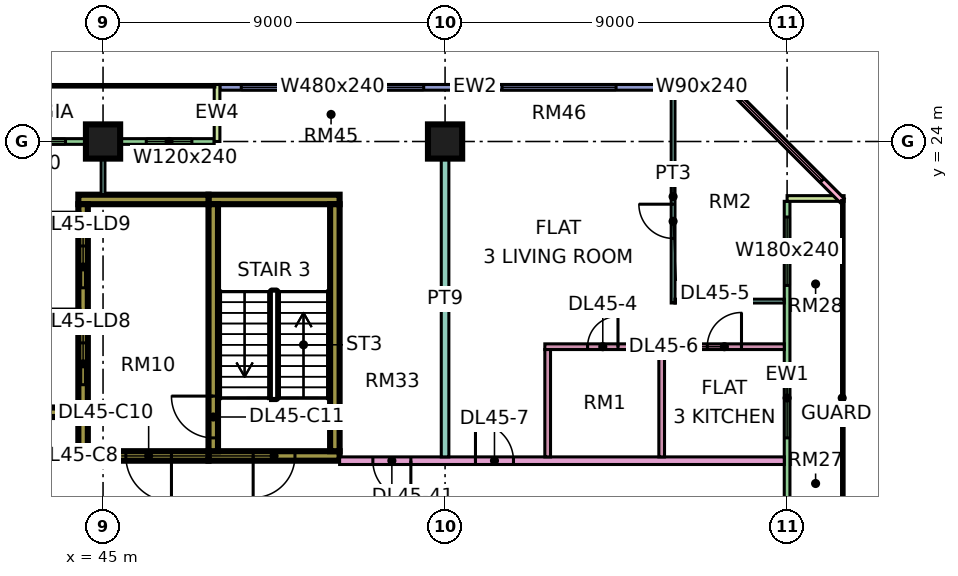
"""IFC4 building model, lengths in metres.
Left out: names, types, materials, properties, quantities, classifications, styles, units other than length and angle.
Written with IfcOpenShell. Run it as: python <this file> out.ifc"""

import sys

from ifc_helpers import new_model, si_unit, direction, frame, frame_2d, origin, origin_2d, place, context, subcontext, project, spatial, rectangle, extrude, element, fill, save


model = new_model("IFC4")
c1 = context("Model", 3, precision=1e-05, world=origin(), true_north=direction((0.0, 1.0)))
c2 = subcontext(c1, "Body", "Model", "MODEL_VIEW")
j1 = project(units=[si_unit("LENGTHUNIT", "METRE"), si_unit("PLANEANGLEUNIT", "RADIAN")], contexts=[c1])
p1 = place(None, origin())
s1 = spatial("IfcSite", under=j1, at=p1, CompositionType="ELEMENT")
p2 = place(p1, origin())
s2 = spatial("IfcBuilding", under=s1, at=p2, CompositionType="ELEMENT")
p3 = place(p2, frame((0.0, 0.0, 194.9)))
s3 = spatial("IfcBuildingStorey", under=s2, at=p3, CompositionType="ELEMENT", Elevation=194.9)
for number, where, z_axis, x_axis in (
    (1, (45.0, 24.0, 0.0), (0.0, 0.0, 1.0), (1.0, 0.0, 0.0)),
    (2, (54.0, 24.0, 0.0), (0.0, 0.0, 1.0), (1.0, 0.0, 0.0)),
):
    element("IfcColumn", number, at=place(p3, frame(where, z_axis=z_axis, x_axis=x_axis)), inside=s3, PredefinedType="COLUMN", context=c2, shape_type="SweptSolid", body=[
        extrude(rectangle(XDim=0.9, YDim=0.9, at=origin_2d()), origin(), (0.0, 0.0, 1.0), 3.75),
    ])
p4 = place(p3, frame((47.775, 15.725, 0.0), z_axis=(0.0, 0.0, 1.0), x_axis=(1.0, 0.0, 0.0)))
e3 = element("IfcWall", 3, at=p4, inside=s3, PredefinedType="SHEAR", context=c2, shape_type="SweptSolid", body=[
    extrude(rectangle(XDim=3.45, YDim=0.25, at=frame_2d((1.725, 0.0))), origin(), (0.0, 0.0, 1.0), 3.75),
])
p5 = place(p4, frame((1.175, 0.0, 0.0)))
e4 = element("IfcOpeningElement", 4, at=p5, cuts=e3, PredefinedType="OPENING", context=c2, shape_type="SweptSolid", body=[
    extrude(rectangle(XDim=1.1, YDim=2.2, at=frame_2d((0.55, 1.1))), frame((0.0, 0.135, 0.0), z_axis=(0.0, -1.0, 0.0), x_axis=(1.0, 0.0, 0.0)), (0.0, 0.0, 1.0), 0.27),
])
p6 = place(p3, frame((47.775, 22.475, 0.0), z_axis=(0.0, 0.0, 1.0), x_axis=(1.0, 0.0, 0.0)))
e5 = element("IfcWall", 5, at=p6, inside=s3, PredefinedType="SHEAR", context=c2, shape_type="SweptSolid", body=[
    extrude(rectangle(XDim=3.45, YDim=0.25, at=frame_2d((1.725, 0.0))), origin(), (0.0, 0.0, 1.0), 3.75),
])
p7 = place(p3, frame((47.9, 15.85, 0.0), z_axis=(0.0, 0.0, 1.0), x_axis=(0.0, 1.0, 0.0)))
e6 = element("IfcWall", 6, at=p7, inside=s3, PredefinedType="SHEAR", context=c2, shape_type="SweptSolid", body=[
    extrude(rectangle(XDim=6.5, YDim=0.25, at=frame_2d((3.25, 0.0))), origin(), (0.0, 0.0, 1.0), 3.75),
])
p8 = place(p7, frame((0.35, 0.0, 0.0)))
e7 = element("IfcOpeningElement", 7, at=p8, cuts=e6, PredefinedType="OPENING", context=c2, shape_type="SweptSolid", body=[
    extrude(rectangle(XDim=1.1, YDim=2.2, at=frame_2d((0.55, 1.1))), frame((0.0, 0.135, 0.0), z_axis=(0.0, -1.0, 0.0), x_axis=(1.0, 0.0, 0.0)), (0.0, 0.0, 1.0), 0.27),
])
p9 = place(p3, frame((51.1, 15.85, 0.0), z_axis=(0.0, 0.0, 1.0), x_axis=(0.0, 1.0, 0.0)))
e8 = element("IfcWall", 8, at=p9, inside=s3, PredefinedType="SHEAR", context=c2, shape_type="SweptSolid", body=[
    extrude(rectangle(XDim=6.5, YDim=0.25, at=frame_2d((3.25, 0.0))), origin(), (0.0, 0.0, 1.0), 3.75),
])
p10 = place(p3, frame((44.35, 15.725, 0.0), z_axis=(0.0, 0.0, 1.0), x_axis=(1.0, 0.0, 0.0)))
e9 = element("IfcWall", 9, at=p10, inside=s3, PredefinedType="SHEAR", context=c2, shape_type="SweptSolid", body=[
    extrude(rectangle(XDim=3.425, YDim=0.25, at=frame_2d((1.712, 0.0))), origin(), (0.0, 0.0, 1.0), 3.75),
])
p11 = place(p10, frame((1.25, 0.0, 0.0)))
e10 = element("IfcOpeningElement", 10, at=p11, cuts=e9, PredefinedType="OPENING", context=c2, shape_type="SweptSolid", body=[
    extrude(rectangle(XDim=1.2, YDim=2.2, at=frame_2d((0.6, 1.1))), frame((0.0, 0.135, 0.0), z_axis=(0.0, -1.0, 0.0), x_axis=(1.0, 0.0, 0.0)), (0.0, 0.0, 1.0), 0.27),
])
p12 = place(p3, frame((44.35, 22.475, 0.0), z_axis=(0.0, 0.0, 1.0), x_axis=(1.0, 0.0, 0.0)))
e11 = element("IfcWall", 11, at=p12, inside=s3, PredefinedType="SHEAR", context=c2, shape_type="SweptSolid", body=[
    extrude(rectangle(XDim=3.425, YDim=0.25, at=frame_2d((1.712, 0.0))), origin(), (0.0, 0.0, 1.0), 3.75),
])
p13 = place(p3, frame((44.475, 15.85, 0.0), z_axis=(0.0, 0.0, 1.0), x_axis=(0.0, 1.0, 0.0)))
e12 = element("IfcWall", 12, at=p13, inside=s3, PredefinedType="SHEAR", context=c2, shape_type="SweptSolid", body=[
    extrude(rectangle(XDim=6.5, YDim=0.25, at=frame_2d((3.25, 0.0))), origin(), (0.0, 0.0, 1.0), 3.75),
])
p14 = place(p13, frame((1.75, 0.0, 0.0)))
e13 = element("IfcOpeningElement", 13, at=p14, cuts=e12, PredefinedType="OPENING", context=c2, shape_type="SweptSolid", body=[
    extrude(rectangle(XDim=1.1, YDim=2.2, at=frame_2d((0.55, 1.1))), frame((0.0, 0.135, 0.0), z_axis=(0.0, -1.0, 0.0), x_axis=(1.0, 0.0, 0.0)), (0.0, 0.0, 1.0), 0.27),
])
p15 = place(p13, frame((4.3, 0.0, 0.0)))
e14 = element("IfcOpeningElement", 14, at=p15, cuts=e12, PredefinedType="OPENING", context=c2, shape_type="SweptSolid", body=[
    extrude(rectangle(XDim=1.1, YDim=2.2, at=frame_2d((0.55, 1.1))), frame((0.0, 0.135, 0.0), z_axis=(0.0, -1.0, 0.0), x_axis=(1.0, 0.0, 0.0)), (0.0, 0.0, 1.0), 0.27),
])
for number, where, z_axis, x_axis in (
    (15, (41.5, 16.875, 0.0), (0.0, 0.0, 1.0), (1.0, 0.0, 0.0)),
    (16, (41.5, 19.425, 0.0), (0.0, 0.0, 1.0), (1.0, 0.0, 0.0)),
    (17, (41.5, 21.975, 0.0), (0.0, 0.0, 1.0), (1.0, 0.0, 0.0)),
):
    element("IfcWall", number, at=place(p3, frame(where, z_axis=z_axis, x_axis=x_axis)), inside=s3, PredefinedType="SHEAR", context=c2, shape_type="SweptSolid", body=[
        extrude(rectangle(XDim=2.85, YDim=0.25, at=frame_2d((1.425, 0.0))), origin(), (0.0, 0.0, 1.0), 3.75),
    ])
p16 = place(p3, frame((61.5, 25.425, 0.0), z_axis=(0.0, 0.0, 1.0), x_axis=(-1.0, 0.0, 0.0)))
e18 = element("IfcWall", 18, at=p16, inside=s3, PredefinedType="SOLIDWALL", context=c2, shape_type="SweptSolid", body=[
    extrude(rectangle(XDim=13.425, YDim=0.15, at=frame_2d((6.712, 0.0))), origin(), (0.0, 0.0, 1.0), 3.35),
])
p17 = place(p16, frame((0.3, 0.0, 0.45)))
e19 = element("IfcOpeningElement", 19, at=p17, cuts=e18, PredefinedType="OPENING", context=c2, shape_type="SweptSolid", body=[
    extrude(rectangle(XDim=0.9, YDim=2.4, at=frame_2d((0.45, 1.2))), frame((0.0, 0.085, 0.0), z_axis=(0.0, -1.0, 0.0), x_axis=(1.0, 0.0, 0.0)), (0.0, 0.0, 1.0), 0.17),
])
p18 = place(p16, frame((3.0, 0.0, 0.45)))
e20 = element("IfcOpeningElement", 20, at=p18, cuts=e18, PredefinedType="OPENING", context=c2, shape_type="SweptSolid", body=[
    extrude(rectangle(XDim=3.0, YDim=2.4, at=frame_2d((1.5, 1.2))), frame((0.0, 0.085, 0.0), z_axis=(0.0, -1.0, 0.0), x_axis=(1.0, 0.0, 0.0)), (0.0, 0.0, 1.0), 0.17),
])
p19 = place(p16, frame((8.062, 0.0, 0.45)))
e21 = element("IfcOpeningElement", 21, at=p19, cuts=e18, PredefinedType="OPENING", context=c2, shape_type="SweptSolid", body=[
    extrude(rectangle(XDim=4.8, YDim=2.4, at=frame_2d((2.4, 1.2))), frame((0.0, 0.085, 0.0), z_axis=(0.0, -1.0, 0.0), x_axis=(1.0, 0.0, 0.0)), (0.0, 0.0, 1.0), 0.17),
])
p20 = place(p3, frame((47.925, 24.0, 0.0), z_axis=(0.0, 0.0, 1.0), x_axis=(-1.0, 0.0, 0.0)))
e22 = element("IfcWall", 22, at=p20, inside=s3, PredefinedType="SOLIDWALL", context=c2, shape_type="SweptSolid", body=[
    extrude(rectangle(XDim=7.35, YDim=0.15, at=frame_2d((3.675, 0.0))), origin(), (0.0, 0.0, 1.0), 3.35),
])
p21 = place(p20, frame((0.587, 0.0, 0.45)))
e23 = element("IfcOpeningElement", 23, at=p21, cuts=e22, PredefinedType="OPENING", context=c2, shape_type="SweptSolid", body=[
    extrude(rectangle(XDim=1.2, YDim=2.4, at=frame_2d((0.6, 1.2))), frame((0.0, 0.085, 0.0), z_axis=(0.0, -1.0, 0.0), x_axis=(1.0, 0.0, 0.0)), (0.0, 0.0, 1.0), 0.17),
])
p22 = place(p20, frame((3.913, 0.0, 0.45)))
e24 = element("IfcOpeningElement", 24, at=p22, cuts=e22, PredefinedType="OPENING", context=c2, shape_type="SweptSolid", body=[
    extrude(rectangle(XDim=3.0, YDim=2.4, at=frame_2d((1.5, 1.2))), frame((0.0, 0.085, 0.0), z_axis=(0.0, -1.0, 0.0), x_axis=(1.0, 0.0, 0.0)), (0.0, 0.0, 1.0), 0.17),
])
p23 = place(p3, frame((48.0, 25.5, 0.0), z_axis=(0.0, 0.0, 1.0), x_axis=(0.0, -1.0, 0.0)))
e25 = element("IfcWall", 25, at=p23, inside=s3, PredefinedType="SOLIDWALL", context=c2, shape_type="SweptSolid", body=[
    extrude(rectangle(XDim=1.5, YDim=0.15, at=frame_2d((0.75, 0.0))), origin(), (0.0, 0.0, 1.0), 3.35),
])
p24 = place(p3, frame((63.0, 12.075, 0.0), z_axis=(0.0, 0.0, 1.0), x_axis=(0.0, 1.0, 0.0)))
e26 = element("IfcWall", 26, at=p24, inside=s3, PredefinedType="SOLIDWALL", context=c2, shape_type="SweptSolid", body=[
    extrude(rectangle(XDim=10.35, YDim=0.15, at=frame_2d((5.175, 0.0))), origin(), (0.0, 0.0, 1.0), 3.35),
])
p25 = place(p24, frame((4.125, 0.0, 0.45)))
e27 = element("IfcOpeningElement", 27, at=p25, cuts=e26, PredefinedType="OPENING", context=c2, shape_type="SweptSolid", body=[
    extrude(rectangle(XDim=1.8, YDim=2.4, at=frame_2d((0.9, 1.2))), frame((0.0, 0.085, 0.0), z_axis=(0.0, -1.0, 0.0), x_axis=(1.0, 0.0, 0.0)), (0.0, 0.0, 1.0), 0.17),
])
p26 = place(p24, frame((8.137, 0.0, 0.45)))
e28 = element("IfcOpeningElement", 28, at=p26, cuts=e26, PredefinedType="OPENING", context=c2, shape_type="SweptSolid", body=[
    extrude(rectangle(XDim=1.8, YDim=2.4, at=frame_2d((0.9, 1.2))), frame((0.0, 0.085, 0.0), z_axis=(0.0, -1.0, 0.0), x_axis=(1.0, 0.0, 0.0)), (0.0, 0.0, 1.0), 0.17),
])
p27 = place(p3, frame((64.5, 22.5, 0.0), z_axis=(0.0, 0.0, 1.0), x_axis=(-1.0, 0.0, 0.0)))
e29 = element("IfcWall", 29, at=p27, inside=s3, PredefinedType="SOLIDWALL", context=c2, shape_type="SweptSolid", body=[
    extrude(rectangle(XDim=1.5, YDim=0.15, at=frame_2d((0.75, 0.0))), origin(), (0.0, 0.0, 1.0), 3.35),
])
p28 = place(p3, frame((64.447, 22.447, 0.0), z_axis=(0.0, 0.0, 1.0), x_axis=(-0.707106781187, 0.707106781187, 0.0)))
e30 = element("IfcWall", 30, at=p28, inside=s3, PredefinedType="SOLIDWALL", context=c2, shape_type="SweptSolid", body=[
    extrude(rectangle(XDim=4.243, YDim=0.15, at=frame_2d((2.121, 0.0))), origin(), (0.0, 0.0, 1.0), 3.35),
])
p29 = place(p28, frame((0.744, 0.0, 0.45)))
e31 = element("IfcOpeningElement", 31, at=p29, cuts=e30, PredefinedType="OPENING", context=c2, shape_type="SweptSolid", body=[
    extrude(rectangle(XDim=3.0, YDim=2.4, at=frame_2d((1.5, 1.2))), frame((0.0, 0.085, 0.0), z_axis=(0.0, -1.0, 0.0), x_axis=(1.0, 0.0, 0.0)), (0.0, 0.0, 1.0), 0.17),
])
p30 = place(p3, frame((34.0, 15.6, 0.0), z_axis=(0.0, 0.0, 1.0), x_axis=(1.0, 0.0, 0.0)))
e32 = element("IfcWall", 32, at=p30, inside=s3, PredefinedType="PARTITIONING", context=c2, shape_type="SweptSolid", body=[
    extrude(rectangle(XDim=10.35, YDim=0.2, at=frame_2d((5.175, 0.0))), origin(), (0.0, 0.0, 1.0), 3.35),
])
p31 = place(p30, frame((5.6, 0.0, 0.0)))
e33 = element("IfcOpeningElement", 33, at=p31, cuts=e32, PredefinedType="OPENING", context=c2, shape_type="SweptSolid", body=[
    extrude(rectangle(XDim=1.0, YDim=2.1, at=frame_2d((0.5, 1.05))), frame((0.0, 0.11, 0.0), z_axis=(0.0, -1.0, 0.0), x_axis=(1.0, 0.0, 0.0)), (0.0, 0.0, 1.0), 0.22),
])
p32 = place(p30, frame((0.45, 0.0, 0.0)))
e34 = element("IfcOpeningElement", 34, at=p32, cuts=e32, PredefinedType="OPENING", context=c2, shape_type="SweptSolid", body=[
    extrude(rectangle(XDim=1.2, YDim=2.1, at=frame_2d((0.6, 1.05))), frame((0.0, 0.11, 0.0), z_axis=(0.0, -1.0, 0.0), x_axis=(1.0, 0.0, 0.0)), (0.0, 0.0, 1.0), 0.22),
])
p33 = place(p3, frame((45.0, 22.6, 0.0), z_axis=(0.0, 0.0, 1.0), x_axis=(0.0, 1.0, 0.0)))
e35 = element("IfcWall", 35, at=p33, inside=s3, PredefinedType="PARTITIONING", context=c2, shape_type="SweptSolid", body=[
    extrude(rectangle(XDim=1.326, YDim=0.1, at=frame_2d((0.663, 0.0))), origin(), (0.0, 0.0, 1.0), 3.35),
])
p34 = place(p3, frame((51.225, 15.6, 0.0), z_axis=(0.0, 0.0, 1.0), x_axis=(1.0, 0.0, 0.0)))
e36 = element("IfcWall", 36, at=p34, inside=s3, PredefinedType="PARTITIONING", context=c2, shape_type="SweptSolid", body=[
    extrude(rectangle(XDim=11.701, YDim=0.2, at=frame_2d((5.851, 0.0))), origin(), (0.0, 0.0, 1.0), 3.35),
])
p35 = place(p34, frame((3.575, 0.0, 0.0)))
e37 = element("IfcOpeningElement", 37, at=p35, cuts=e36, PredefinedType="OPENING", context=c2, shape_type="SweptSolid", body=[
    extrude(rectangle(XDim=1.0, YDim=2.1, at=frame_2d((0.5, 1.05))), frame((0.0, 0.11, 0.0), z_axis=(0.0, -1.0, 0.0), x_axis=(1.0, 0.0, 0.0)), (0.0, 0.0, 1.0), 0.22),
])
p36 = place(p34, frame((0.875, 0.0, 0.0)))
e38 = element("IfcOpeningElement", 38, at=p36, cuts=e36, PredefinedType="OPENING", context=c2, shape_type="SweptSolid", body=[
    extrude(rectangle(XDim=1.0, YDim=2.1, at=frame_2d((0.5, 1.05))), frame((0.0, 0.11, 0.0), z_axis=(0.0, -1.0, 0.0), x_axis=(1.0, 0.0, 0.0)), (0.0, 0.0, 1.0), 0.22),
])
p37 = place(p3, frame((54.0, 15.7, 0.0), z_axis=(0.0, 0.0, 1.0), x_axis=(0.0, 1.0, 0.0)))
e39 = element("IfcWall", 39, at=p37, inside=s3, PredefinedType="PARTITIONING", context=c2, shape_type="SweptSolid", body=[
    extrude(rectangle(XDim=8.3, YDim=0.2, at=frame_2d((4.15, 0.0))), origin(), (0.0, 0.0, 1.0), 3.35),
])
p38 = place(p3, frame((56.625, 18.6, 0.0), z_axis=(0.0, 0.0, 1.0), x_axis=(1.0, 0.0, 0.0)))
e40 = element("IfcWall", 40, at=p38, inside=s3, PredefinedType="PARTITIONING", context=c2, shape_type="SweptSolid", body=[
    extrude(rectangle(XDim=6.301, YDim=0.15, at=frame_2d((3.15, 0.0))), origin(), (0.0, 0.0, 1.0), 3.35),
])
p39 = place(p38, frame((1.125, 0.0, 0.0)))
e41 = element("IfcOpeningElement", 41, at=p39, cuts=e40, PredefinedType="OPENING", context=c2, shape_type="SweptSolid", body=[
    extrude(rectangle(XDim=0.8, YDim=2.1, at=frame_2d((0.4, 1.05))), frame((0.0, 0.085, 0.0), z_axis=(0.0, -1.0, 0.0), x_axis=(1.0, 0.0, 0.0)), (0.0, 0.0, 1.0), 0.17),
])
p40 = place(p38, frame((4.275, 0.0, 0.0)))
e42 = element("IfcOpeningElement", 42, at=p40, cuts=e40, PredefinedType="OPENING", context=c2, shape_type="SweptSolid", body=[
    extrude(rectangle(XDim=0.9, YDim=2.1, at=frame_2d((0.45, 1.05))), frame((0.0, 0.085, 0.0), z_axis=(0.0, -1.0, 0.0), x_axis=(1.0, 0.0, 0.0)), (0.0, 0.0, 1.0), 0.17),
])
for number, where, z_axis, x_axis in (
    (43, (56.7, 15.7, 0.0), (0.0, 0.0, 1.0), (0.0, 1.0, 0.0)),
    (44, (59.7, 15.7, 0.0), (0.0, 0.0, 1.0), (0.0, 1.0, 0.0)),
):
    element("IfcWall", number, at=place(p3, frame(where, z_axis=z_axis, x_axis=x_axis)), inside=s3, PredefinedType="PARTITIONING", context=c2, shape_type="SweptSolid", body=[
        extrude(rectangle(XDim=2.825, YDim=0.15, at=frame_2d((1.413, 0.0))), origin(), (0.0, 0.0, 1.0), 3.35),
    ])
p41 = place(p3, frame((60.0, 19.75, 0.0), z_axis=(0.0, 0.0, 1.0), x_axis=(0.0, 1.0, 0.0)))
e45 = element("IfcWall", 45, at=p41, inside=s3, PredefinedType="PARTITIONING", context=c2, shape_type="SweptSolid", body=[
    extrude(rectangle(XDim=5.6, YDim=0.1, at=frame_2d((2.8, 0.0))), origin(), (0.0, 0.0, 1.0), 3.35),
])
p42 = place(p41, frame((1.7, 0.0, 0.0)))
e46 = element("IfcOpeningElement", 46, at=p42, cuts=e45, PredefinedType="OPENING", context=c2, shape_type="SweptSolid", body=[
    extrude(rectangle(XDim=0.9, YDim=2.1, at=frame_2d((0.45, 1.05))), frame((0.0, 0.06, 0.0), z_axis=(0.0, -1.0, 0.0), x_axis=(1.0, 0.0, 0.0)), (0.0, 0.0, 1.0), 0.12),
])
p43 = place(p3, frame((60.05, 19.8, 0.0), z_axis=(0.0, 0.0, 1.0), x_axis=(1.0, 0.0, 0.0)))
e47 = element("IfcWall", 47, at=p43, inside=s3, PredefinedType="PARTITIONING", context=c2, shape_type="SweptSolid", body=[
    extrude(rectangle(XDim=2.876, YDim=0.1, at=frame_2d((1.438, 0.0))), origin(), (0.0, 0.0, 1.0), 3.35),
])
p44 = place(p17, origin())
e48 = element("IfcWindow", 48, at=p44, inside=s3, PartitioningType="SINGLE_PANEL", PredefinedType="WINDOW", context=c2, shape_type="SweptSolid", body=[
    extrude(rectangle(XDim=0.9, YDim=2.4, at=frame_2d((0.45, 1.2))), frame((0.0, 0.03, 0.0), z_axis=(0.0, -1.0, 0.0), x_axis=(1.0, 0.0, 0.0)), (0.0, 0.0, 1.0), 0.06),
])
fill(e19, e48)
p45 = place(p18, origin())
e49 = element("IfcWindow", 49, at=p45, inside=s3, PartitioningType="SINGLE_PANEL", PredefinedType="WINDOW", context=c2, shape_type="SweptSolid", body=[
    extrude(rectangle(XDim=3.0, YDim=2.4, at=frame_2d((1.5, 1.2))), frame((0.0, 0.03, 0.0), z_axis=(0.0, -1.0, 0.0), x_axis=(1.0, 0.0, 0.0)), (0.0, 0.0, 1.0), 0.06),
])
fill(e20, e49)
p46 = place(p19, origin())
e50 = element("IfcWindow", 50, at=p46, inside=s3, PartitioningType="SINGLE_PANEL", PredefinedType="WINDOW", context=c2, shape_type="SweptSolid", body=[
    extrude(rectangle(XDim=4.8, YDim=2.4, at=frame_2d((2.4, 1.2))), frame((0.0, 0.03, 0.0), z_axis=(0.0, -1.0, 0.0), x_axis=(1.0, 0.0, 0.0)), (0.0, 0.0, 1.0), 0.06),
])
fill(e21, e50)
p47 = place(p21, origin())
e51 = element("IfcWindow", 51, at=p47, inside=s3, PartitioningType="SINGLE_PANEL", PredefinedType="WINDOW", context=c2, shape_type="SweptSolid", body=[
    extrude(rectangle(XDim=1.2, YDim=2.4, at=frame_2d((0.6, 1.2))), frame((0.0, 0.03, 0.0), z_axis=(0.0, -1.0, 0.0), x_axis=(1.0, 0.0, 0.0)), (0.0, 0.0, 1.0), 0.06),
])
fill(e23, e51)
p48 = place(p22, origin())
e52 = element("IfcWindow", 52, at=p48, inside=s3, PartitioningType="SINGLE_PANEL", PredefinedType="WINDOW", context=c2, shape_type="SweptSolid", body=[
    extrude(rectangle(XDim=3.0, YDim=2.4, at=frame_2d((1.5, 1.2))), frame((0.0, 0.03, 0.0), z_axis=(0.0, -1.0, 0.0), x_axis=(1.0, 0.0, 0.0)), (0.0, 0.0, 1.0), 0.06),
])
fill(e24, e52)
p49 = place(p25, origin())
e53 = element("IfcWindow", 53, at=p49, inside=s3, PartitioningType="SINGLE_PANEL", PredefinedType="WINDOW", context=c2, shape_type="SweptSolid", body=[
    extrude(rectangle(XDim=1.8, YDim=2.4, at=frame_2d((0.9, 1.2))), frame((0.0, 0.03, 0.0), z_axis=(0.0, -1.0, 0.0), x_axis=(1.0, 0.0, 0.0)), (0.0, 0.0, 1.0), 0.06),
])
fill(e27, e53)
p50 = place(p26, origin())
e54 = element("IfcWindow", 54, at=p50, inside=s3, PartitioningType="SINGLE_PANEL", PredefinedType="WINDOW", context=c2, shape_type="SweptSolid", body=[
    extrude(rectangle(XDim=1.8, YDim=2.4, at=frame_2d((0.9, 1.2))), frame((0.0, 0.03, 0.0), z_axis=(0.0, -1.0, 0.0), x_axis=(1.0, 0.0, 0.0)), (0.0, 0.0, 1.0), 0.06),
])
fill(e28, e54)
p51 = place(p29, origin())
e55 = element("IfcWindow", 55, at=p51, inside=s3, PartitioningType="SINGLE_PANEL", PredefinedType="WINDOW", context=c2, shape_type="SweptSolid", body=[
    extrude(rectangle(XDim=3.0, YDim=2.4, at=frame_2d((1.5, 1.2))), frame((0.0, 0.03, 0.0), z_axis=(0.0, -1.0, 0.0), x_axis=(1.0, 0.0, 0.0)), (0.0, 0.0, 1.0), 0.06),
])
fill(e31, e55)
p52 = place(p5, frame((1.1, 0.0, 0.0), z_axis=(0.0, 0.0, 1.0), x_axis=(-1.0, 0.0, 0.0)))
e56 = element("IfcDoor", 56, at=p52, inside=s3, OperationType="SINGLE_SWING_LEFT", PredefinedType="DOOR", context=c2, shape_type="SweptSolid", body=[
    extrude(rectangle(XDim=1.1, YDim=2.2, at=frame_2d((0.55, 1.1))), frame((0.0, 0.025, 0.0), z_axis=(0.0, -1.0, 0.0), x_axis=(1.0, 0.0, 0.0)), (0.0, 0.0, 1.0), 0.05),
])
fill(e4, e56)
p53 = place(p11, origin())
e57 = element("IfcDoor", 57, at=p53, inside=s3, OperationType="SINGLE_SWING_RIGHT", PredefinedType="DOOR", context=c2, shape_type="SweptSolid", body=[
    extrude(rectangle(XDim=1.2, YDim=2.2, at=frame_2d((0.6, 1.1))), frame((0.0, 0.025, 0.0), z_axis=(0.0, -1.0, 0.0), x_axis=(1.0, 0.0, 0.0)), (0.0, 0.0, 1.0), 0.05),
])
fill(e10, e57)
p54 = place(p8, frame((1.1, 0.0, 0.0), z_axis=(0.0, 0.0, 1.0), x_axis=(-1.0, 0.0, 0.0)))
e58 = element("IfcDoor", 58, at=p54, inside=s3, OperationType="SINGLE_SWING_RIGHT", PredefinedType="DOOR", context=c2, shape_type="SweptSolid", body=[
    extrude(rectangle(XDim=1.1, YDim=2.2, at=frame_2d((0.55, 1.1))), frame((0.0, 0.025, 0.0), z_axis=(0.0, -1.0, 0.0), x_axis=(1.0, 0.0, 0.0)), (0.0, 0.0, 1.0), 0.05),
])
fill(e7, e58)
p55 = place(p14, origin())
e59 = element("IfcDoor", 59, at=p55, inside=s3, OperationType="DOUBLE_DOOR_SLIDING", PredefinedType="DOOR", context=c2, shape_type="SweptSolid", body=[
    extrude(rectangle(XDim=1.1, YDim=2.2, at=frame_2d((0.55, 1.1))), frame((0.0, 0.025, 0.0), z_axis=(0.0, -1.0, 0.0), x_axis=(1.0, 0.0, 0.0)), (0.0, 0.0, 1.0), 0.05),
])
fill(e13, e59)
p56 = place(p15, origin())
e60 = element("IfcDoor", 60, at=p56, inside=s3, OperationType="DOUBLE_DOOR_SLIDING", PredefinedType="DOOR", context=c2, shape_type="SweptSolid", body=[
    extrude(rectangle(XDim=1.1, YDim=2.2, at=frame_2d((0.55, 1.1))), frame((0.0, 0.025, 0.0), z_axis=(0.0, -1.0, 0.0), x_axis=(1.0, 0.0, 0.0)), (0.0, 0.0, 1.0), 0.05),
])
fill(e14, e60)
p57 = place(p39, frame((0.8, 0.0, 0.0), z_axis=(0.0, 0.0, 1.0), x_axis=(-1.0, 0.0, 0.0)))
e61 = element("IfcDoor", 61, at=p57, inside=s3, OperationType="SINGLE_SWING_RIGHT", PredefinedType="DOOR", context=c2, shape_type="SweptSolid", body=[
    extrude(rectangle(XDim=0.8, YDim=2.1, at=frame_2d((0.4, 1.05))), frame((0.0, 0.025, 0.0), z_axis=(0.0, -1.0, 0.0), x_axis=(1.0, 0.0, 0.0)), (0.0, 0.0, 1.0), 0.05),
])
fill(e41, e61)
p58 = place(p42, frame((0.9, 0.0, 0.0), z_axis=(0.0, 0.0, 1.0), x_axis=(-1.0, 0.0, 0.0)))
e62 = element("IfcDoor", 62, at=p58, inside=s3, OperationType="SINGLE_SWING_RIGHT", PredefinedType="DOOR", context=c2, shape_type="SweptSolid", body=[
    extrude(rectangle(XDim=0.9, YDim=2.1, at=frame_2d((0.45, 1.05))), frame((0.0, 0.025, 0.0), z_axis=(0.0, -1.0, 0.0), x_axis=(1.0, 0.0, 0.0)), (0.0, 0.0, 1.0), 0.05),
])
fill(e46, e62)
p59 = place(p40, frame((0.9, 0.0, 0.0), z_axis=(0.0, 0.0, 1.0), x_axis=(-1.0, 0.0, 0.0)))
e63 = element("IfcDoor", 63, at=p59, inside=s3, OperationType="SINGLE_SWING_RIGHT", PredefinedType="DOOR", context=c2, shape_type="SweptSolid", body=[
    extrude(rectangle(XDim=0.9, YDim=2.1, at=frame_2d((0.45, 1.05))), frame((0.0, 0.025, 0.0), z_axis=(0.0, -1.0, 0.0), x_axis=(1.0, 0.0, 0.0)), (0.0, 0.0, 1.0), 0.05),
])
fill(e42, e63)
p60 = place(p35, origin())
e64 = element("IfcDoor", 64, at=p60, inside=s3, OperationType="SINGLE_SWING_LEFT", PredefinedType="DOOR", context=c2, shape_type="SweptSolid", body=[
    extrude(rectangle(XDim=1.0, YDim=2.1, at=frame_2d((0.5, 1.05))), frame((0.0, 0.025, 0.0), z_axis=(0.0, -1.0, 0.0), x_axis=(1.0, 0.0, 0.0)), (0.0, 0.0, 1.0), 0.05),
])
fill(e37, e64)
p61 = place(p36, origin())
e65 = element("IfcDoor", 65, at=p61, inside=s3, OperationType="SINGLE_SWING_RIGHT", PredefinedType="DOOR", context=c2, shape_type="SweptSolid", body=[
    extrude(rectangle(XDim=1.0, YDim=2.1, at=frame_2d((0.5, 1.05))), frame((0.0, 0.025, 0.0), z_axis=(0.0, -1.0, 0.0), x_axis=(1.0, 0.0, 0.0)), (0.0, 0.0, 1.0), 0.05),
])
fill(e38, e65)
save(model, sys.argv[1])
